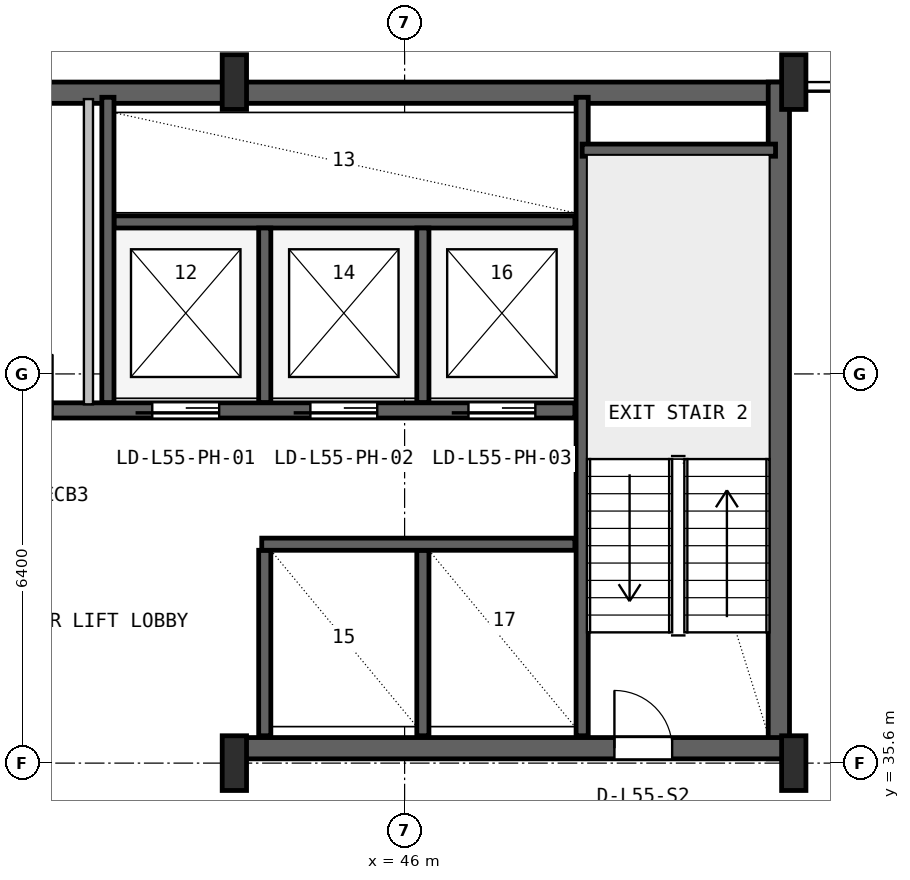
"""IFC4 building model, lengths in metres.
Left out: names, types, materials, properties, quantities, classifications, styles, units other than length and angle.
Written with IfcOpenShell. Run it as: python <this file> out.ifc"""

import sys

from ifc_helpers import new_model, si_unit, direction, frame, frame_2d, origin, origin_2d, place, context, subcontext, project, spatial, rectangle, i_section, extrude, source, transform, mapped, element, fill, save


model = new_model("IFC4")
c1 = context("Model", 3, precision=1e-05, world=origin(), true_north=direction((0.0, 1.0)))
c2 = subcontext(c1, "Body", "Model", "MODEL_VIEW")
j1 = project(units=[si_unit("LENGTHUNIT", "METRE"), si_unit("PLANEANGLEUNIT", "RADIAN")], contexts=[c1])
p1 = place(None, origin())
s1 = spatial("IfcSite", under=j1, at=p1, CompositionType="ELEMENT")
p2 = place(p1, origin())
s2 = spatial("IfcBuilding", under=s1, at=p2, CompositionType="ELEMENT")
p3 = place(p2, frame((0.0, 0.0, 222.6)))
s3 = spatial("IfcBuildingStorey", under=s2, at=p3, CompositionType="ELEMENT", Elevation=222.6)
p4 = place(p3, frame((15.6, 46.625, 0.0), z_axis=(0.0, 0.0, 1.0), x_axis=(1.0, 0.0, 0.0)))
e1 = element("IfcWall", 1, at=p4, inside=s3, PredefinedType="SHEAR", context=c2, shape_type="SweptSolid", body=[
    extrude(rectangle(XDim=36.8, YDim=0.35, at=frame_2d((18.4, 0.0))), origin(), (0.0, 0.0, 1.0), 3.55),
])
p5 = place(p3, frame((52.155, 35.67, 0.0), z_axis=(0.0, 0.0, 1.0), x_axis=(0.0, 1.0, 0.0)))
e2 = element("IfcWall", 2, at=p5, inside=s3, PredefinedType="SHEAR", context=c2, shape_type="SweptSolid", body=[
    extrude(rectangle(XDim=11.13, YDim=0.35, at=frame_2d((5.565, 0.0))), origin(), (0.0, 0.0, 1.0), 3.55),
])
p6 = place(p3, frame((43.2, 35.845, 0.0), z_axis=(0.0, 0.0, 1.0), x_axis=(1.0, 0.0, 0.0)))
e3 = element("IfcWall", 3, at=p6, inside=s3, PredefinedType="SHEAR", context=c2, shape_type="SweptSolid", body=[
    extrude(rectangle(XDim=9.13, YDim=0.35, at=frame_2d((4.565, 0.0))), origin(), (0.0, 0.0, 1.0), 3.55),
])
p7 = place(p6, frame((6.25, 0.0, 0.0)))
e4 = element("IfcOpeningElement", 4, at=p7, cuts=e3, PredefinedType="OPENING", context=c2, shape_type="SweptSolid", body=[
    extrude(rectangle(XDim=0.95, YDim=2.1, at=frame_2d((0.475, 1.05))), frame((0.0, 0.185, 0.0), z_axis=(0.0, -1.0, 0.0), x_axis=(1.0, 0.0, 0.0)), (0.0, 0.0, 1.0), 0.37),
])
m1 = source(origin(), c2, "Body", "SweptSolid", [
    extrude(i_section(OverallWidth=0.4, OverallDepth=0.9, WebThickness=0.016, FlangeThickness=0.028, FilletRadius=0.016, at=origin_2d()), origin(), (0.0, 0.0, 1.0), 3.8),
])
for number, where, z_axis, x_axis in (
    (5, (43.2, 35.6, 0.0), (0.0, 0.0, 1.0), (1.0, 0.0, 0.0)),
    (6, (43.2, 46.8, 0.0), (0.0, 0.0, 1.0), (1.0, 0.0, 0.0)),
    (7, (52.4, 35.6, 0.0), (0.0, 0.0, 1.0), (1.0, 0.0, 0.0)),
    (8, (52.4, 46.8, 0.0), (0.0, 0.0, 1.0), (1.0, 0.0, 0.0)),
):
    element("IfcColumn", number, at=place(p3, frame(where, z_axis=z_axis, x_axis=x_axis)), inside=s3, PredefinedType="COLUMN", context=c2, shape_type="MappedRepresentation", body=[
        mapped(m1, transform((0.0, 0.0, 0.0), x_axis=(1.0, 0.0, 0.0), y_axis=(0.0, 1.0, 0.0), z_axis=(0.0, 0.0, 1.0), scale=1.0)),
    ])
p8 = place(p3, frame((48.92, 36.05, 0.0), z_axis=(0.0, 0.0, 1.0), x_axis=(0.0, 1.0, 0.0)))
e9 = element("IfcWall", 9, at=p8, inside=s3, PredefinedType="SHEAR", context=c2, shape_type="SweptSolid", body=[
    extrude(rectangle(XDim=10.5, YDim=0.2, at=frame_2d((5.25, 0.0))), origin(), (0.0, 0.0, 1.0), 3.55),
])
p9 = place(p3, frame((48.92, 45.68, 0.0), z_axis=(0.0, 0.0, 1.0), x_axis=(1.0, 0.0, 0.0)))
e10 = element("IfcWall", 10, at=p9, inside=s3, PredefinedType="SHEAR", context=c2, shape_type="SweptSolid", body=[
    extrude(rectangle(XDim=3.18, YDim=0.2, at=frame_2d((1.59, 0.0))), origin(), (0.0, 0.0, 1.0), 3.55),
])
p10 = place(p3, frame((24.98, 41.4, 0.0), z_axis=(0.0, 0.0, 1.0), x_axis=(1.0, 0.0, 0.0)))
e11 = element("IfcWall", 11, at=p10, inside=s3, PredefinedType="SHEAR", context=c2, shape_type="SweptSolid", body=[
    extrude(rectangle(XDim=23.82, YDim=0.25, at=frame_2d((11.91, 0.0))), origin(), (0.0, 0.0, 1.0), 3.55),
])
p11 = place(p10, frame((16.87, 0.0, 0.0)))
e12 = element("IfcOpeningElement", 12, at=p11, cuts=e11, PredefinedType="OPENING", context=c2, shape_type="SweptSolid", body=[
    extrude(rectangle(XDim=1.1, YDim=2.18, at=frame_2d((0.55, 1.09))), frame((0.0, 0.135, 0.0), z_axis=(0.0, -1.0, 0.0), x_axis=(1.0, 0.0, 0.0)), (0.0, 0.0, 1.0), 0.27),
])
p12 = place(p10, frame((19.47, 0.0, 0.0)))
e13 = element("IfcOpeningElement", 13, at=p12, cuts=e11, PredefinedType="OPENING", context=c2, shape_type="SweptSolid", body=[
    extrude(rectangle(XDim=1.1, YDim=2.18, at=frame_2d((0.55, 1.09))), frame((0.0, 0.135, 0.0), z_axis=(0.0, -1.0, 0.0), x_axis=(1.0, 0.0, 0.0)), (0.0, 0.0, 1.0), 0.27),
])
p13 = place(p10, frame((22.07, 0.0, 0.0)))
e14 = element("IfcOpeningElement", 14, at=p13, cuts=e11, PredefinedType="OPENING", context=c2, shape_type="SweptSolid", body=[
    extrude(rectangle(XDim=1.1, YDim=2.18, at=frame_2d((0.55, 1.09))), frame((0.0, 0.135, 0.0), z_axis=(0.0, -1.0, 0.0), x_axis=(1.0, 0.0, 0.0)), (0.0, 0.0, 1.0), 0.27),
])
p14 = place(p10, frame((1.81, 0.0, 0.0)))
e15 = element("IfcOpeningElement", 15, at=p14, cuts=e11, PredefinedType="OPENING", context=c2, shape_type="SweptSolid", body=[
    extrude(rectangle(XDim=0.92, YDim=2.08, at=frame_2d((0.46, 1.04))), frame((0.0, 0.135, 0.0), z_axis=(0.0, -1.0, 0.0), x_axis=(1.0, 0.0, 0.0)), (0.0, 0.0, 1.0), 0.27),
])
p15 = place(p10, frame((5.71, 0.0, 0.0)))
e16 = element("IfcOpeningElement", 16, at=p15, cuts=e11, PredefinedType="OPENING", context=c2, shape_type="SweptSolid", body=[
    extrude(rectangle(XDim=0.92, YDim=2.08, at=frame_2d((0.46, 1.04))), frame((0.0, 0.135, 0.0), z_axis=(0.0, -1.0, 0.0), x_axis=(1.0, 0.0, 0.0)), (0.0, 0.0, 1.0), 0.27),
])
p16 = place(p10, frame((9.21, 0.0, 0.0)))
e17 = element("IfcOpeningElement", 17, at=p16, cuts=e11, PredefinedType="OPENING", context=c2, shape_type="SweptSolid", body=[
    extrude(rectangle(XDim=0.92, YDim=2.08, at=frame_2d((0.46, 1.04))), frame((0.0, 0.135, 0.0), z_axis=(0.0, -1.0, 0.0), x_axis=(1.0, 0.0, 0.0)), (0.0, 0.0, 1.0), 0.27),
])
p17 = place(p10, frame((11.96, 0.0, 0.0)))
e18 = element("IfcOpeningElement", 18, at=p17, cuts=e11, PredefinedType="OPENING", context=c2, shape_type="SweptSolid", body=[
    extrude(rectangle(XDim=0.92, YDim=2.08, at=frame_2d((0.46, 1.04))), frame((0.0, 0.135, 0.0), z_axis=(0.0, -1.0, 0.0), x_axis=(1.0, 0.0, 0.0)), (0.0, 0.0, 1.0), 0.27),
])
p18 = place(p10, frame((14.31, 0.0, 0.0)))
e19 = element("IfcOpeningElement", 19, at=p18, cuts=e11, PredefinedType="OPENING", context=c2, shape_type="SweptSolid", body=[
    extrude(rectangle(XDim=0.92, YDim=2.08, at=frame_2d((0.46, 1.04))), frame((0.0, 0.135, 0.0), z_axis=(0.0, -1.0, 0.0), x_axis=(1.0, 0.0, 0.0)), (0.0, 0.0, 1.0), 0.27),
])
p19 = place(p3, frame((41.22, 44.5, 0.0), z_axis=(0.0, 0.0, 1.0), x_axis=(1.0, 0.0, 0.0)))
e20 = element("IfcWall", 20, at=p19, inside=s3, PredefinedType="SHEAR", context=c2, shape_type="SweptSolid", body=[
    extrude(rectangle(XDim=7.58, YDim=0.2, at=frame_2d((3.79, 0.0))), origin(), (0.0, 0.0, 1.0), 3.55),
])
p20 = place(p3, frame((41.12, 41.53, 0.0), z_axis=(0.0, 0.0, 1.0), x_axis=(0.0, 1.0, 0.0)))
e21 = element("IfcWall", 21, at=p20, inside=s3, PredefinedType="SHEAR", context=c2, shape_type="SweptSolid", body=[
    extrude(rectangle(XDim=5.02, YDim=0.2, at=frame_2d((2.51, 0.0))), origin(), (0.0, 0.0, 1.0), 3.55),
])
for number, where, z_axis, x_axis in (
    (22, (43.7, 41.53, 0.0), (0.0, 0.0, 1.0), (0.0, 1.0, 0.0)),
    (23, (46.3, 41.53, 0.0), (0.0, 0.0, 1.0), (0.0, 1.0, 0.0)),
):
    element("IfcWall", number, at=place(p3, frame(where, z_axis=z_axis, x_axis=x_axis)), inside=s3, PredefinedType="SHEAR", context=c2, shape_type="SweptSolid", body=[
        extrude(rectangle(XDim=2.87, YDim=0.2, at=frame_2d((1.435, 0.0))), origin(), (0.0, 0.0, 1.0), 3.55),
    ])
for number, where, z_axis, x_axis in (
    (24, (43.7, 36.05, 0.0), (0.0, 0.0, 1.0), (0.0, 1.0, 0.0)),
    (25, (46.3, 36.05, 0.0), (0.0, 0.0, 1.0), (0.0, 1.0, 0.0)),
):
    element("IfcWall", number, at=place(p3, frame(where, z_axis=z_axis, x_axis=x_axis)), inside=s3, PredefinedType="SHEAR", context=c2, shape_type="SweptSolid", body=[
        extrude(rectangle(XDim=3.05, YDim=0.2, at=frame_2d((1.525, 0.0))), origin(), (0.0, 0.0, 1.0), 3.55),
    ])
p21 = place(p3, frame((43.65, 39.2, 0.0), z_axis=(0.0, 0.0, 1.0), x_axis=(1.0, 0.0, 0.0)))
e26 = element("IfcWall", 26, at=p21, inside=s3, PredefinedType="SHEAR", context=c2, shape_type="SweptSolid", body=[
    extrude(rectangle(XDim=5.15, YDim=0.2, at=frame_2d((2.575, 0.0))), origin(), (0.0, 0.0, 1.0), 3.55),
])
p22 = place(p3, frame((40.8, 41.5, 0.0), z_axis=(0.0, 0.0, 1.0), x_axis=(0.0, 1.0, 0.0)))
e27 = element("IfcWall", 27, at=p22, inside=s3, PredefinedType="PARTITIONING", context=c2, shape_type="SweptSolid", body=[
    extrude(rectangle(XDim=5.02, YDim=0.15, at=frame_2d((2.51, 0.0))), origin(), (0.0, 0.0, 1.0), 3.53),
])
m2 = source(origin(), c2, "Body", "SweptSolid", [
    extrude(rectangle(XDim=0.95, YDim=2.1, at=frame_2d((0.475, 1.05))), frame((0.0, 0.025, 0.0), z_axis=(0.0, -1.0, 0.0), x_axis=(1.0, 0.0, 0.0)), (0.0, 0.0, 1.0), 0.05),
])
p23 = place(p7, origin())
e28 = element("IfcDoor", 28, at=p23, inside=s3, OperationType="SINGLE_SWING_LEFT", PredefinedType="DOOR", context=c2, shape_type="MappedRepresentation", body=[
    mapped(m2, transform((0.0, 0.0, 0.0), x_axis=(1.0, 0.0, 0.0), y_axis=(0.0, 1.0, 0.0), z_axis=(0.0, 0.0, 1.0), scale=1.0)),
])
fill(e4, e28)
m3 = source(origin(), c2, "Body", "SweptSolid", [
    extrude(rectangle(XDim=1.1, YDim=2.18, at=frame_2d((0.55, 1.09))), frame((0.0, 0.025, 0.0), z_axis=(0.0, -1.0, 0.0), x_axis=(1.0, 0.0, 0.0)), (0.0, 0.0, 1.0), 0.05),
])
p24 = place(p11, frame((1.1, 0.0, 0.0), z_axis=(0.0, 0.0, 1.0), x_axis=(-1.0, 0.0, 0.0)))
e29 = element("IfcDoor", 29, at=p24, inside=s3, OperationType="SLIDING_TO_LEFT", PredefinedType="DOOR", context=c2, shape_type="MappedRepresentation", body=[
    mapped(m3, transform((0.0, 0.0, 0.0), x_axis=(1.0, 0.0, 0.0), y_axis=(0.0, 1.0, 0.0), z_axis=(0.0, 0.0, 1.0), scale=1.0)),
])
fill(e12, e29)
p25 = place(p12, frame((1.1, 0.0, 0.0), z_axis=(0.0, 0.0, 1.0), x_axis=(-1.0, 0.0, 0.0)))
e30 = element("IfcDoor", 30, at=p25, inside=s3, OperationType="SLIDING_TO_LEFT", PredefinedType="DOOR", context=c2, shape_type="MappedRepresentation", body=[
    mapped(m3, transform((0.0, 0.0, 0.0), x_axis=(1.0, 0.0, 0.0), y_axis=(0.0, 1.0, 0.0), z_axis=(0.0, 0.0, 1.0), scale=1.0)),
])
fill(e13, e30)
p26 = place(p13, frame((1.1, 0.0, 0.0), z_axis=(0.0, 0.0, 1.0), x_axis=(-1.0, 0.0, 0.0)))
e31 = element("IfcDoor", 31, at=p26, inside=s3, OperationType="SLIDING_TO_LEFT", PredefinedType="DOOR", context=c2, shape_type="MappedRepresentation", body=[
    mapped(m3, transform((0.0, 0.0, 0.0), x_axis=(1.0, 0.0, 0.0), y_axis=(0.0, 1.0, 0.0), z_axis=(0.0, 0.0, 1.0), scale=1.0)),
])
fill(e14, e31)
m4 = source(origin(), c2, "Body", "SweptSolid", [
    extrude(rectangle(XDim=0.92, YDim=2.08, at=frame_2d((0.46, 1.04))), frame((0.0, 0.025, 0.0), z_axis=(0.0, -1.0, 0.0), x_axis=(1.0, 0.0, 0.0)), (0.0, 0.0, 1.0), 0.05),
])
p27 = place(p18, origin())
e32 = element("IfcDoor", 32, at=p27, inside=s3, OperationType="SINGLE_SWING_RIGHT", PredefinedType="DOOR", context=c2, shape_type="MappedRepresentation", body=[
    mapped(m4, transform((0.0, 0.0, 0.0), x_axis=(1.0, 0.0, 0.0), y_axis=(0.0, 1.0, 0.0), z_axis=(0.0, 0.0, 1.0), scale=1.0)),
])
fill(e19, e32)
save(model, sys.argv[1])
